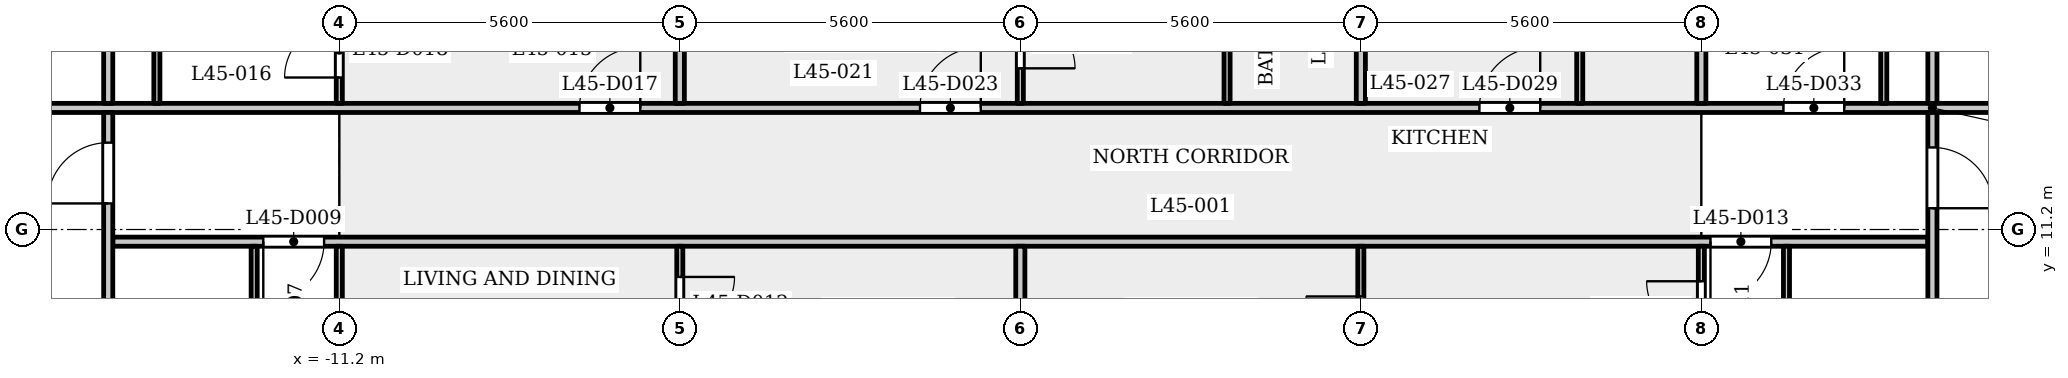
"""IFC4 building model, lengths in metres.
Left out: names, types, materials, properties, quantities, classifications, styles, units other than length and angle.
Written with IfcOpenShell. Run it as: python <this file> out.ifc"""

import sys

from ifc_helpers import new_model, si_unit, direction, frame, frame_2d, origin, place, context, subcontext, project, spatial, rectangle, extrude, element, fill, save


model = new_model("IFC4")
c1 = context("Model", 3, precision=1e-05, world=origin(), true_north=direction((0.0, 1.0)))
c2 = subcontext(c1, "Body", "Model", "MODEL_VIEW")
j1 = project(units=[si_unit("LENGTHUNIT", "METRE"), si_unit("PLANEANGLEUNIT", "RADIAN")], contexts=[c1])
p1 = place(None, origin())
s1 = spatial("IfcSite", under=j1, at=p1, CompositionType="ELEMENT")
p2 = place(p1, origin())
s2 = spatial("IfcBuilding", under=s1, at=p2, CompositionType="ELEMENT")
p3 = place(p2, frame((0.0, 0.0, 174.6)))
s3 = spatial("IfcBuildingStorey", under=s2, at=p3, CompositionType="ELEMENT", Elevation=174.6)
p4 = place(p3, frame((-14.925, 11.0, 0.0), z_axis=(0.0, 0.0, 1.0), x_axis=(1.0, 0.0, 0.0)))
e1 = element("IfcWall", 1, at=p4, inside=s3, PredefinedType="PARTITIONING", context=c2, shape_type="SweptSolid", body=[
    extrude(rectangle(XDim=29.85, YDim=0.15, at=frame_2d((14.925, 0.0))), origin(), (0.0, 0.0, 1.0), 3.15),
])
p5 = place(p4, frame((2.475, 0.0, 0.0)))
e2 = element("IfcOpeningElement", 2, at=p5, cuts=e1, PredefinedType="OPENING", context=c2, shape_type="SweptSolid", body=[
    extrude(rectangle(XDim=1.0, YDim=2.1, at=frame_2d((0.5, 1.05))), frame((0.0, 0.085, 0.0), z_axis=(0.0, -1.0, 0.0), x_axis=(1.0, 0.0, 0.0)), (0.0, 0.0, 1.0), 0.17),
])
p6 = place(p4, frame((26.275, 0.0, 0.0)))
e3 = element("IfcOpeningElement", 3, at=p6, cuts=e1, PredefinedType="OPENING", context=c2, shape_type="SweptSolid", body=[
    extrude(rectangle(XDim=1.0, YDim=2.1, at=frame_2d((0.5, 1.05))), frame((0.0, 0.085, 0.0), z_axis=(0.0, -1.0, 0.0), x_axis=(1.0, 0.0, 0.0)), (0.0, 0.0, 1.0), 0.17),
])
p7 = place(p3, frame((-17.4, 13.2, 0.0), z_axis=(0.0, 0.0, 1.0), x_axis=(1.0, 0.0, 0.0)))
e4 = element("IfcWall", 4, at=p7, inside=s3, PredefinedType="PARTITIONING", context=c2, shape_type="SweptSolid", body=[
    extrude(rectangle(XDim=34.8, YDim=0.15, at=frame_2d((17.4, 0.0))), origin(), (0.0, 0.0, 1.0), 3.15),
])
p8 = place(p7, frame((0.25, 0.0, 0.0)))
e5 = element("IfcOpeningElement", 5, at=p8, cuts=e4, PredefinedType="OPENING", context=c2, shape_type="SweptSolid", body=[
    extrude(rectangle(XDim=1.0, YDim=2.1, at=frame_2d((0.5, 1.05))), frame((0.0, 0.085, 0.0), z_axis=(0.0, -1.0, 0.0), x_axis=(1.0, 0.0, 0.0)), (0.0, 0.0, 1.0), 0.17),
])
p9 = place(p7, frame((33.65, 0.0, 0.0)))
e6 = element("IfcOpeningElement", 6, at=p9, cuts=e4, PredefinedType="OPENING", context=c2, shape_type="SweptSolid", body=[
    extrude(rectangle(XDim=1.0, YDim=2.1, at=frame_2d((0.5, 1.05))), frame((0.0, 0.085, 0.0), z_axis=(0.0, -1.0, 0.0), x_axis=(1.0, 0.0, 0.0)), (0.0, 0.0, 1.0), 0.17),
])
p10 = place(p7, frame((10.15, 0.0, 0.0)))
e7 = element("IfcOpeningElement", 7, at=p10, cuts=e4, PredefinedType="OPENING", context=c2, shape_type="SweptSolid", body=[
    extrude(rectangle(XDim=1.0, YDim=2.1, at=frame_2d((0.5, 1.05))), frame((0.0, 0.085, 0.0), z_axis=(0.0, -1.0, 0.0), x_axis=(1.0, 0.0, 0.0)), (0.0, 0.0, 1.0), 0.17),
])
p11 = place(p7, frame((15.75, 0.0, 0.0)))
e8 = element("IfcOpeningElement", 8, at=p11, cuts=e4, PredefinedType="OPENING", context=c2, shape_type="SweptSolid", body=[
    extrude(rectangle(XDim=1.0, YDim=2.1, at=frame_2d((0.5, 1.05))), frame((0.0, 0.085, 0.0), z_axis=(0.0, -1.0, 0.0), x_axis=(1.0, 0.0, 0.0)), (0.0, 0.0, 1.0), 0.17),
])
p12 = place(p7, frame((24.95, 0.0, 0.0)))
e9 = element("IfcOpeningElement", 9, at=p12, cuts=e4, PredefinedType="OPENING", context=c2, shape_type="SweptSolid", body=[
    extrude(rectangle(XDim=1.0, YDim=2.1, at=frame_2d((0.5, 1.05))), frame((0.0, 0.085, 0.0), z_axis=(0.0, -1.0, 0.0), x_axis=(1.0, 0.0, 0.0)), (0.0, 0.0, 1.0), 0.17),
])
p13 = place(p7, frame((29.95, 0.0, 0.0)))
e10 = element("IfcOpeningElement", 10, at=p13, cuts=e4, PredefinedType="OPENING", context=c2, shape_type="SweptSolid", body=[
    extrude(rectangle(XDim=1.0, YDim=2.1, at=frame_2d((0.5, 1.05))), frame((0.0, 0.085, 0.0), z_axis=(0.0, -1.0, 0.0), x_axis=(1.0, 0.0, 0.0)), (0.0, 0.0, 1.0), 0.17),
])
p14 = place(p3, frame((-15.0, 6.769, 0.0), z_axis=(0.0, 0.0, 1.0), x_axis=(0.0, 1.0, 0.0)))
e11 = element("IfcWall", 11, at=p14, inside=s3, PredefinedType="PARTITIONING", context=c2, shape_type="SweptSolid", body=[
    extrude(rectangle(XDim=6.356, YDim=0.15, at=frame_2d((3.178, 0.0))), origin(), (0.0, 0.0, 1.0), 3.15),
])
p15 = place(p14, frame((4.86, 0.0, 0.0)))
e12 = element("IfcOpeningElement", 12, at=p15, cuts=e11, PredefinedType="OPENING", context=c2, shape_type="SweptSolid", body=[
    extrude(rectangle(XDim=1.0, YDim=2.1, at=frame_2d((0.5, 1.05))), frame((0.0, 0.085, 0.0), z_axis=(0.0, -1.0, 0.0), x_axis=(1.0, 0.0, 0.0)), (0.0, 0.0, 1.0), 0.17),
])
p16 = place(p3, frame((-15.0, 13.275, 0.0), z_axis=(0.0, 0.0, 1.0), x_axis=(0.0, 1.0, 0.0)))
e13 = element("IfcWall", 13, at=p16, inside=s3, PredefinedType="PARTITIONING", context=c2, shape_type="SweptSolid", body=[
    extrude(rectangle(XDim=2.05, YDim=0.15, at=frame_2d((1.025, 0.0))), origin(), (0.0, 0.0, 1.0), 3.15),
])
p17 = place(p3, frame((-14.2, 13.275, 0.0), z_axis=(0.0, 0.0, 1.0), x_axis=(0.0, 1.0, 0.0)))
e14 = element("IfcWall", 14, at=p17, inside=s3, PredefinedType="PARTITIONING", context=c2, shape_type="SweptSolid", body=[
    extrude(rectangle(XDim=3.175, YDim=0.1, at=frame_2d((1.587, 0.0))), origin(), (0.0, 0.0, 1.0), 3.15),
])
p18 = place(p3, frame((-12.6, 7.32, 0.0), z_axis=(0.0, 0.0, 1.0), x_axis=(0.0, 1.0, 0.0)))
e15 = element("IfcWall", 15, at=p18, inside=s3, PredefinedType="PARTITIONING", context=c2, shape_type="SweptSolid", body=[
    extrude(rectangle(XDim=3.605, YDim=0.1, at=frame_2d((1.802, 0.0))), origin(), (0.0, 0.0, 1.0), 3.15),
])
p19 = place(p18, frame((1.729, 0.0, 0.0)))
e16 = element("IfcOpeningElement", 16, at=p19, cuts=e15, PredefinedType="OPENING", context=c2, shape_type="SweptSolid", body=[
    extrude(rectangle(XDim=0.8, YDim=2.1, at=frame_2d((0.4, 1.05))), frame((0.0, 0.06, 0.0), z_axis=(0.0, -1.0, 0.0), x_axis=(1.0, 0.0, 0.0)), (0.0, 0.0, 1.0), 0.12),
])
p20 = place(p3, frame((-11.2, 7.32, 0.0), z_axis=(0.0, 0.0, 1.0), x_axis=(0.0, 1.0, 0.0)))
e17 = element("IfcWall", 17, at=p20, inside=s3, PredefinedType="PARTITIONING", context=c2, shape_type="SweptSolid", body=[
    extrude(rectangle(XDim=3.605, YDim=0.1, at=frame_2d((1.802, 0.0))), origin(), (0.0, 0.0, 1.0), 3.15),
])
p21 = place(p20, frame((1.7, 0.0, 0.0)))
e18 = element("IfcOpeningElement", 18, at=p21, cuts=e17, PredefinedType="OPENING", context=c2, shape_type="SweptSolid", body=[
    extrude(rectangle(XDim=0.9, YDim=2.1, at=frame_2d((0.45, 1.05))), frame((0.0, 0.06, 0.0), z_axis=(0.0, -1.0, 0.0), x_axis=(1.0, 0.0, 0.0)), (0.0, 0.0, 1.0), 0.12),
])
p22 = place(p3, frame((-11.2, 13.275, 0.0), z_axis=(0.0, 0.0, 1.0), x_axis=(0.0, 1.0, 0.0)))
e19 = element("IfcWall", 19, at=p22, inside=s3, PredefinedType="PARTITIONING", context=c2, shape_type="SweptSolid", body=[
    extrude(rectangle(XDim=3.175, YDim=0.1, at=frame_2d((1.587, 0.0))), origin(), (0.0, 0.0, 1.0), 3.15),
])
p23 = place(p22, frame((0.425, 0.0, 0.0)))
e20 = element("IfcOpeningElement", 20, at=p23, cuts=e19, PredefinedType="OPENING", context=c2, shape_type="SweptSolid", body=[
    extrude(rectangle(XDim=0.9, YDim=2.1, at=frame_2d((0.45, 1.05))), frame((0.0, 0.06, 0.0), z_axis=(0.0, -1.0, 0.0), x_axis=(1.0, 0.0, 0.0)), (0.0, 0.0, 1.0), 0.12),
])
p24 = place(p3, frame((-5.6, 7.32, 0.0), z_axis=(0.0, 0.0, 1.0), x_axis=(0.0, 1.0, 0.0)))
e21 = element("IfcWall", 21, at=p24, inside=s3, PredefinedType="PARTITIONING", context=c2, shape_type="SweptSolid", body=[
    extrude(rectangle(XDim=3.605, YDim=0.1, at=frame_2d((1.802, 0.0))), origin(), (0.0, 0.0, 1.0), 3.15),
])
p25 = place(p24, frame((2.2, 0.0, 0.0)))
e22 = element("IfcOpeningElement", 22, at=p25, cuts=e21, PredefinedType="OPENING", context=c2, shape_type="SweptSolid", body=[
    extrude(rectangle(XDim=0.9, YDim=2.1, at=frame_2d((0.45, 1.05))), frame((0.0, 0.06, 0.0), z_axis=(0.0, -1.0, 0.0), x_axis=(1.0, 0.0, 0.0)), (0.0, 0.0, 1.0), 0.12),
])
p26 = place(p3, frame((-5.6, 13.275, 0.0), z_axis=(0.0, 0.0, 1.0), x_axis=(0.0, 1.0, 0.0)))
e23 = element("IfcWall", 23, at=p26, inside=s3, PredefinedType="PARTITIONING", context=c2, shape_type="SweptSolid", body=[
    extrude(rectangle(XDim=3.175, YDim=0.15, at=frame_2d((1.587, 0.0))), origin(), (0.0, 0.0, 1.0), 3.15),
])
p27 = place(p3, frame((0.0, 13.275, 0.0), z_axis=(0.0, 0.0, 1.0), x_axis=(0.0, 1.0, 0.0)))
e24 = element("IfcWall", 24, at=p27, inside=s3, PredefinedType="PARTITIONING", context=c2, shape_type="SweptSolid", body=[
    extrude(rectangle(XDim=3.175, YDim=0.1, at=frame_2d((1.587, 0.0))), origin(), (0.0, 0.0, 1.0), 3.15),
])
p28 = place(p27, frame((0.576, 0.0, 0.0)))
e25 = element("IfcOpeningElement", 25, at=p28, cuts=e24, PredefinedType="OPENING", context=c2, shape_type="SweptSolid", body=[
    extrude(rectangle(XDim=0.9, YDim=2.1, at=frame_2d((0.45, 1.05))), frame((0.0, 0.06, 0.0), z_axis=(0.0, -1.0, 0.0), x_axis=(1.0, 0.0, 0.0)), (0.0, 0.0, 1.0), 0.12),
])
p29 = place(p3, frame((0.0, 7.32, 0.0), z_axis=(0.0, 0.0, 1.0), x_axis=(0.0, 1.0, 0.0)))
e26 = element("IfcWall", 26, at=p29, inside=s3, PredefinedType="PARTITIONING", context=c2, shape_type="SweptSolid", body=[
    extrude(rectangle(XDim=3.605, YDim=0.15, at=frame_2d((1.802, 0.0))), origin(), (0.0, 0.0, 1.0), 3.15),
])
p30 = place(p3, frame((3.4, 13.275, 0.0), z_axis=(0.0, 0.0, 1.0), x_axis=(0.0, 1.0, 0.0)))
e27 = element("IfcWall", 27, at=p30, inside=s3, PredefinedType="PARTITIONING", context=c2, shape_type="SweptSolid", body=[
    extrude(rectangle(XDim=3.175, YDim=0.1, at=frame_2d((1.587, 0.0))), origin(), (0.0, 0.0, 1.0), 3.15),
])
p31 = place(p3, frame((5.6, 7.32, 0.0), z_axis=(0.0, 0.0, 1.0), x_axis=(0.0, 1.0, 0.0)))
e28 = element("IfcWall", 28, at=p31, inside=s3, PredefinedType="PARTITIONING", context=c2, shape_type="SweptSolid", body=[
    extrude(rectangle(XDim=3.605, YDim=0.1, at=frame_2d((1.802, 0.0))), origin(), (0.0, 0.0, 1.0), 3.15),
])
p32 = place(p31, frame((1.879, 0.0, 0.0)))
e29 = element("IfcOpeningElement", 29, at=p32, cuts=e28, PredefinedType="OPENING", context=c2, shape_type="SweptSolid", body=[
    extrude(rectangle(XDim=0.9, YDim=2.1, at=frame_2d((0.45, 1.05))), frame((0.0, 0.06, 0.0), z_axis=(0.0, -1.0, 0.0), x_axis=(1.0, 0.0, 0.0)), (0.0, 0.0, 1.0), 0.12),
])
p33 = place(p3, frame((5.6, 13.275, 0.0), z_axis=(0.0, 0.0, 1.0), x_axis=(0.0, 1.0, 0.0)))
e30 = element("IfcWall", 30, at=p33, inside=s3, PredefinedType="PARTITIONING", context=c2, shape_type="SweptSolid", body=[
    extrude(rectangle(XDim=3.175, YDim=0.15, at=frame_2d((1.587, 0.0))), origin(), (0.0, 0.0, 1.0), 3.15),
])
p34 = place(p3, frame((9.2, 13.275, 0.0), z_axis=(0.0, 0.0, 1.0), x_axis=(0.0, 1.0, 0.0)))
e31 = element("IfcWall", 31, at=p34, inside=s3, PredefinedType="PARTITIONING", context=c2, shape_type="SweptSolid", body=[
    extrude(rectangle(XDim=3.175, YDim=0.1, at=frame_2d((1.587, 0.0))), origin(), (0.0, 0.0, 1.0), 3.15),
])
p35 = place(p3, frame((11.2, 7.32, 0.0), z_axis=(0.0, 0.0, 1.0), x_axis=(0.0, 1.0, 0.0)))
e32 = element("IfcWall", 32, at=p35, inside=s3, PredefinedType="PARTITIONING", context=c2, shape_type="SweptSolid", body=[
    extrude(rectangle(XDim=3.605, YDim=0.1, at=frame_2d((1.802, 0.0))), origin(), (0.0, 0.0, 1.0), 3.15),
])
p36 = place(p35, frame((2.129, 0.0, 0.0)))
e33 = element("IfcOpeningElement", 33, at=p36, cuts=e32, PredefinedType="OPENING", context=c2, shape_type="SweptSolid", body=[
    extrude(rectangle(XDim=0.9, YDim=2.1, at=frame_2d((0.45, 1.05))), frame((0.0, 0.06, 0.0), z_axis=(0.0, -1.0, 0.0), x_axis=(1.0, 0.0, 0.0)), (0.0, 0.0, 1.0), 0.12),
])
p37 = place(p3, frame((11.2, 13.275, 0.0), z_axis=(0.0, 0.0, 1.0), x_axis=(0.0, 1.0, 0.0)))
e34 = element("IfcWall", 34, at=p37, inside=s3, PredefinedType="PARTITIONING", context=c2, shape_type="SweptSolid", body=[
    extrude(rectangle(XDim=3.175, YDim=0.15, at=frame_2d((1.587, 0.0))), origin(), (0.0, 0.0, 1.0), 3.15),
])
p38 = place(p3, frame((12.6, 7.32, 0.0), z_axis=(0.0, 0.0, 1.0), x_axis=(0.0, 1.0, 0.0)))
e35 = element("IfcWall", 35, at=p38, inside=s3, PredefinedType="PARTITIONING", context=c2, shape_type="SweptSolid", body=[
    extrude(rectangle(XDim=3.605, YDim=0.1, at=frame_2d((1.802, 0.0))), origin(), (0.0, 0.0, 1.0), 3.15),
])
p39 = place(p38, frame((1.7, 0.0, 0.0)))
e36 = element("IfcOpeningElement", 36, at=p39, cuts=e35, PredefinedType="OPENING", context=c2, shape_type="SweptSolid", body=[
    extrude(rectangle(XDim=0.8, YDim=2.1, at=frame_2d((0.4, 1.05))), frame((0.0, 0.06, 0.0), z_axis=(0.0, -1.0, 0.0), x_axis=(1.0, 0.0, 0.0)), (0.0, 0.0, 1.0), 0.12),
])
p40 = place(p3, frame((14.2, 13.275, 0.0), z_axis=(0.0, 0.0, 1.0), x_axis=(0.0, 1.0, 0.0)))
e37 = element("IfcWall", 37, at=p40, inside=s3, PredefinedType="PARTITIONING", context=c2, shape_type="SweptSolid", body=[
    extrude(rectangle(XDim=3.175, YDim=0.1, at=frame_2d((1.587, 0.0))), origin(), (0.0, 0.0, 1.0), 3.15),
])
p41 = place(p3, frame((15.0, 6.769, 0.0), z_axis=(0.0, 0.0, 1.0), x_axis=(0.0, 1.0, 0.0)))
e38 = element("IfcWall", 38, at=p41, inside=s3, PredefinedType="PARTITIONING", context=c2, shape_type="SweptSolid", body=[
    extrude(rectangle(XDim=6.356, YDim=0.15, at=frame_2d((3.178, 0.0))), origin(), (0.0, 0.0, 1.0), 3.15),
])
p42 = place(p41, frame((4.781, 0.0, 0.0)))
e39 = element("IfcOpeningElement", 39, at=p42, cuts=e38, PredefinedType="OPENING", context=c2, shape_type="SweptSolid", body=[
    extrude(rectangle(XDim=1.0, YDim=2.1, at=frame_2d((0.5, 1.05))), frame((0.0, 0.085, 0.0), z_axis=(0.0, -1.0, 0.0), x_axis=(1.0, 0.0, 0.0)), (0.0, 0.0, 1.0), 0.17),
])
p43 = place(p3, frame((15.0, 13.275, 0.0), z_axis=(0.0, 0.0, 1.0), x_axis=(0.0, 1.0, 0.0)))
e40 = element("IfcWall", 40, at=p43, inside=s3, PredefinedType="PARTITIONING", context=c2, shape_type="SweptSolid", body=[
    extrude(rectangle(XDim=2.05, YDim=0.15, at=frame_2d((1.025, 0.0))), origin(), (0.0, 0.0, 1.0), 3.15),
])
p44 = place(p15, origin())
e41 = element("IfcDoor", 41, at=p44, inside=s3, OperationType="SINGLE_SWING_RIGHT", PredefinedType="DOOR", context=c2, shape_type="SweptSolid", body=[
    extrude(rectangle(XDim=1.0, YDim=2.1, at=frame_2d((0.5, 1.05))), frame((0.0, 0.025, 0.0), z_axis=(0.0, -1.0, 0.0), x_axis=(1.0, 0.0, 0.0)), (0.0, 0.0, 1.0), 0.05),
])
fill(e12, e41)
p45 = place(p42, origin())
e42 = element("IfcDoor", 42, at=p45, inside=s3, OperationType="SINGLE_SWING_LEFT", PredefinedType="DOOR", context=c2, shape_type="SweptSolid", body=[
    extrude(rectangle(XDim=1.0, YDim=2.1, at=frame_2d((0.5, 1.05))), frame((0.0, 0.025, 0.0), z_axis=(0.0, -1.0, 0.0), x_axis=(1.0, 0.0, 0.0)), (0.0, 0.0, 1.0), 0.05),
])
fill(e39, e42)
p46 = place(p5, origin())
e43 = element("IfcDoor", 43, at=p46, inside=s3, OperationType="SINGLE_SWING_LEFT", PredefinedType="DOOR", context=c2, shape_type="SweptSolid", body=[
    extrude(rectangle(XDim=1.0, YDim=2.1, at=frame_2d((0.5, 1.05))), frame((0.0, 0.025, 0.0), z_axis=(0.0, -1.0, 0.0), x_axis=(1.0, 0.0, 0.0)), (0.0, 0.0, 1.0), 0.05),
])
fill(e2, e43)
p47 = place(p25, origin())
e44 = element("IfcDoor", 44, at=p47, inside=s3, OperationType="SINGLE_SWING_RIGHT", PredefinedType="DOOR", context=c2, shape_type="SweptSolid", body=[
    extrude(rectangle(XDim=0.9, YDim=2.1, at=frame_2d((0.45, 1.05))), frame((0.0, 0.025, 0.0), z_axis=(0.0, -1.0, 0.0), x_axis=(1.0, 0.0, 0.0)), (0.0, 0.0, 1.0), 0.05),
])
fill(e22, e44)
p48 = place(p6, origin())
e45 = element("IfcDoor", 45, at=p48, inside=s3, OperationType="SINGLE_SWING_LEFT", PredefinedType="DOOR", context=c2, shape_type="SweptSolid", body=[
    extrude(rectangle(XDim=1.0, YDim=2.1, at=frame_2d((0.5, 1.05))), frame((0.0, 0.025, 0.0), z_axis=(0.0, -1.0, 0.0), x_axis=(1.0, 0.0, 0.0)), (0.0, 0.0, 1.0), 0.05),
])
fill(e3, e45)
p49 = place(p36, origin())
e46 = element("IfcDoor", 46, at=p49, inside=s3, OperationType="SINGLE_SWING_LEFT", PredefinedType="DOOR", context=c2, shape_type="SweptSolid", body=[
    extrude(rectangle(XDim=0.9, YDim=2.1, at=frame_2d((0.45, 1.05))), frame((0.0, 0.025, 0.0), z_axis=(0.0, -1.0, 0.0), x_axis=(1.0, 0.0, 0.0)), (0.0, 0.0, 1.0), 0.05),
])
fill(e33, e46)
p50 = place(p32, origin())
e47 = element("IfcDoor", 47, at=p50, inside=s3, OperationType="SINGLE_SWING_LEFT", PredefinedType="DOOR", context=c2, shape_type="SweptSolid", body=[
    extrude(rectangle(XDim=0.9, YDim=2.1, at=frame_2d((0.45, 1.05))), frame((0.0, 0.025, 0.0), z_axis=(0.0, -1.0, 0.0), x_axis=(1.0, 0.0, 0.0)), (0.0, 0.0, 1.0), 0.05),
])
fill(e29, e47)
p51 = place(p10, origin())
e48 = element("IfcDoor", 48, at=p51, inside=s3, OperationType="SINGLE_SWING_LEFT", PredefinedType="DOOR", context=c2, shape_type="SweptSolid", body=[
    extrude(rectangle(XDim=1.0, YDim=2.1, at=frame_2d((0.5, 1.05))), frame((0.0, 0.025, 0.0), z_axis=(0.0, -1.0, 0.0), x_axis=(1.0, 0.0, 0.0)), (0.0, 0.0, 1.0), 0.05),
])
fill(e7, e48)
p52 = place(p23, origin())
e49 = element("IfcDoor", 49, at=p52, inside=s3, OperationType="SINGLE_SWING_RIGHT", PredefinedType="DOOR", context=c2, shape_type="SweptSolid", body=[
    extrude(rectangle(XDim=0.9, YDim=2.1, at=frame_2d((0.45, 1.05))), frame((0.0, 0.025, 0.0), z_axis=(0.0, -1.0, 0.0), x_axis=(1.0, 0.0, 0.0)), (0.0, 0.0, 1.0), 0.05),
])
fill(e20, e49)
p53 = place(p11, origin())
e50 = element("IfcDoor", 50, at=p53, inside=s3, OperationType="SINGLE_SWING_LEFT", PredefinedType="DOOR", context=c2, shape_type="SweptSolid", body=[
    extrude(rectangle(XDim=1.0, YDim=2.1, at=frame_2d((0.5, 1.05))), frame((0.0, 0.025, 0.0), z_axis=(0.0, -1.0, 0.0), x_axis=(1.0, 0.0, 0.0)), (0.0, 0.0, 1.0), 0.05),
])
fill(e8, e50)
p54 = place(p28, origin())
e51 = element("IfcDoor", 51, at=p54, inside=s3, OperationType="SINGLE_SWING_LEFT", PredefinedType="DOOR", context=c2, shape_type="SweptSolid", body=[
    extrude(rectangle(XDim=0.9, YDim=2.1, at=frame_2d((0.45, 1.05))), frame((0.0, 0.025, 0.0), z_axis=(0.0, -1.0, 0.0), x_axis=(1.0, 0.0, 0.0)), (0.0, 0.0, 1.0), 0.05),
])
fill(e25, e51)
p55 = place(p12, origin())
e52 = element("IfcDoor", 52, at=p55, inside=s3, OperationType="SINGLE_SWING_LEFT", PredefinedType="DOOR", context=c2, shape_type="SweptSolid", body=[
    extrude(rectangle(XDim=1.0, YDim=2.1, at=frame_2d((0.5, 1.05))), frame((0.0, 0.025, 0.0), z_axis=(0.0, -1.0, 0.0), x_axis=(1.0, 0.0, 0.0)), (0.0, 0.0, 1.0), 0.05),
])
fill(e9, e52)
p56 = place(p13, origin())
e53 = element("IfcDoor", 53, at=p56, inside=s3, OperationType="SINGLE_SWING_LEFT", PredefinedType="DOOR", context=c2, shape_type="SweptSolid", body=[
    extrude(rectangle(XDim=1.0, YDim=2.1, at=frame_2d((0.5, 1.05))), frame((0.0, 0.025, 0.0), z_axis=(0.0, -1.0, 0.0), x_axis=(1.0, 0.0, 0.0)), (0.0, 0.0, 1.0), 0.05),
])
fill(e10, e53)
save(model, sys.argv[1])
